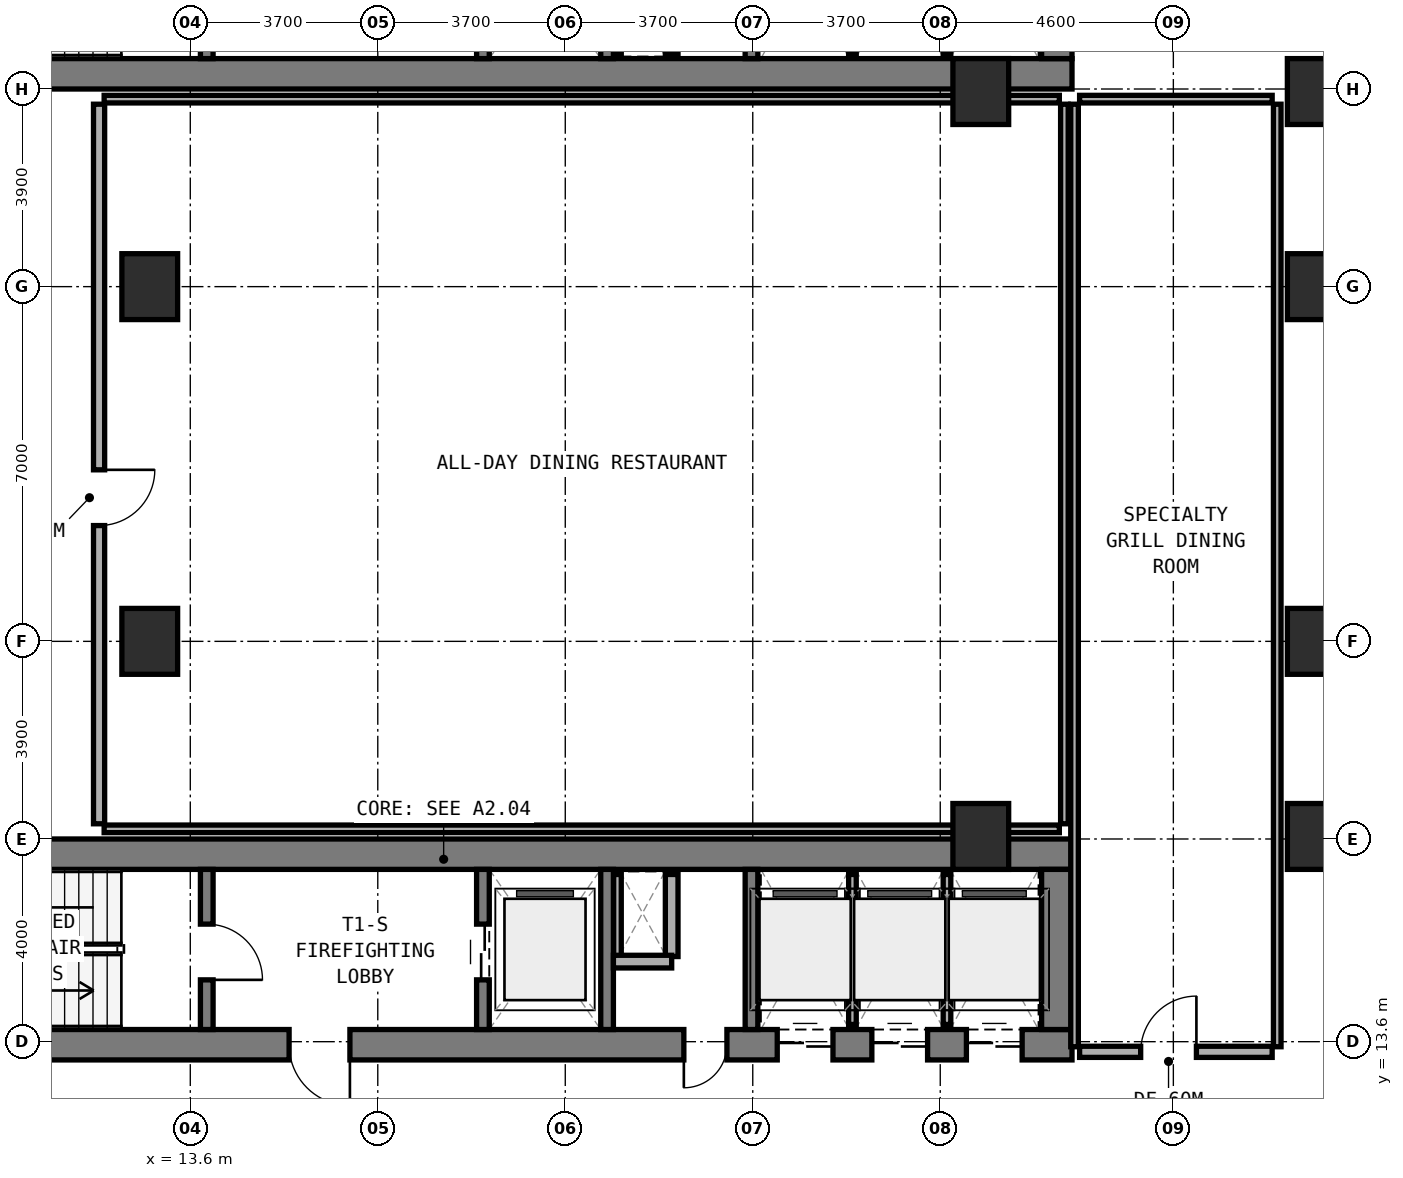
"""IFC4 building model, lengths in metres.
Left out: names, types, materials, properties, quantities, classifications, styles, units other than length and angle.
Written with IfcOpenShell. Run it as: python <this file> out.ifc"""

import sys

from ifc_helpers import new_model, si_unit, direction, frame, frame_2d, origin, origin_2d, place, context, subcontext, project, spatial, rectangle, extrude, element, fill, save


model = new_model("IFC4")
c1 = context("Model", 3, precision=1e-05, world=origin(), true_north=direction((0.0, 1.0)))
c2 = subcontext(c1, "Body", "Model", "MODEL_VIEW")
j1 = project(units=[si_unit("LENGTHUNIT", "METRE"), si_unit("PLANEANGLEUNIT", "RADIAN")], contexts=[c1])
p1 = place(None, origin())
s1 = spatial("IfcSite", under=j1, at=p1, CompositionType="ELEMENT")
p2 = place(p1, origin())
s2 = spatial("IfcBuilding", under=s1, at=p2, CompositionType="ELEMENT")
p3 = place(p2, frame((0.0, 0.0, 5.4)))
s3 = spatial("IfcBuildingStorey", under=s2, at=p3, CompositionType="ELEMENT", Elevation=5.4)
p4 = place(p3, frame((6.2, 32.7, 0.0), z_axis=(0.0, 0.0, 1.0), x_axis=(1.0, 0.0, 0.0)))
e1 = element("IfcWall", 1, at=p4, inside=s3, PredefinedType="SHEAR", context=c2, shape_type="SweptSolid", body=[
    extrude(rectangle(XDim=24.8, YDim=0.6, at=frame_2d((12.4, 0.0))), origin(), (0.0, 0.0, 1.0), 4.8),
])
p5 = place(p3, frame((30.7, 33.0, 0.0), z_axis=(0.0, 0.0, 1.0), x_axis=(0.0, 1.0, 0.0)))
e2 = element("IfcWall", 2, at=p5, inside=s3, PredefinedType="SHEAR", context=c2, shape_type="SweptSolid", body=[
    extrude(rectangle(XDim=3.16, YDim=0.6, at=frame_2d((1.58, 0.0))), origin(), (0.0, 0.0, 1.0), 4.8),
])
p6 = place(p3, frame((13.925, 33.0, 0.0), z_axis=(0.0, 0.0, 1.0), x_axis=(0.0, 1.0, 0.0)))
e3 = element("IfcWall", 3, at=p6, inside=s3, PredefinedType="STANDARD", context=c2, shape_type="SweptSolid", body=[
    extrude(rectangle(XDim=3.16, YDim=0.25, at=frame_2d((1.58, 0.0))), origin(), (0.0, 0.0, 1.0), 4.45),
])
p7 = place(p6, frame((0.98, 0.0, 0.0)))
e4 = element("IfcOpeningElement", 4, at=p7, cuts=e3, PredefinedType="OPENING", context=c2, shape_type="SweptSolid", body=[
    extrude(rectangle(XDim=1.1, YDim=2.15, at=frame_2d((0.55, 1.075))), frame((0.0, 0.135, 0.0), z_axis=(0.0, -1.0, 0.0), x_axis=(1.0, 0.0, 0.0)), (0.0, 0.0, 1.0), 0.27),
])
p8 = place(p3, frame((19.375, 33.0, 0.0), z_axis=(0.0, 0.0, 1.0), x_axis=(0.0, 1.0, 0.0)))
e5 = element("IfcWall", 5, at=p8, inside=s3, PredefinedType="STANDARD", context=c2, shape_type="SweptSolid", body=[
    extrude(rectangle(XDim=3.16, YDim=0.25, at=frame_2d((1.58, 0.0))), origin(), (0.0, 0.0, 1.0), 4.45),
])
p9 = place(p8, frame((0.98, 0.0, 0.0)))
e6 = element("IfcOpeningElement", 6, at=p9, cuts=e5, PredefinedType="OPENING", context=c2, shape_type="SweptSolid", body=[
    extrude(rectangle(XDim=1.1, YDim=2.15, at=frame_2d((0.55, 1.075))), frame((0.0, 0.135, 0.0), z_axis=(0.0, -1.0, 0.0), x_axis=(1.0, 0.0, 0.0)), (0.0, 0.0, 1.0), 0.27),
])
for number, where, z_axis, x_axis in (
    (7, (21.825, 33.0, 0.0), (0.0, 0.0, 1.0), (0.0, 1.0, 0.0)),
    (8, (24.675, 33.0, 0.0), (0.0, 0.0, 1.0), (0.0, 1.0, 0.0)),
):
    element("IfcWall", number, at=place(p3, frame(where, z_axis=z_axis, x_axis=x_axis)), inside=s3, PredefinedType="STANDARD", context=c2, shape_type="SweptSolid", body=[
        extrude(rectangle(XDim=3.16, YDim=0.25, at=frame_2d((1.58, 0.0))), origin(), (0.0, 0.0, 1.0), 4.45),
    ])
p10 = place(p3, frame((6.2, 13.54, 0.0), z_axis=(0.0, 0.0, 1.0), x_axis=(1.0, 0.0, 0.0)))
e9 = element("IfcWall", 9, at=p10, inside=s3, PredefinedType="SHEAR", context=c2, shape_type="SweptSolid", body=[
    extrude(rectangle(XDim=24.8, YDim=0.6, at=frame_2d((12.4, 0.0))), origin(), (0.0, 0.0, 1.0), 4.8),
])
p11 = place(p10, frame((9.35, 0.0, 0.0)))
e10 = element("IfcOpeningElement", 10, at=p11, cuts=e9, PredefinedType="OPENING", context=c2, shape_type="SweptSolid", body=[
    extrude(rectangle(XDim=1.2, YDim=2.15, at=frame_2d((0.6, 1.075))), frame((0.0, 0.31, 0.0), z_axis=(0.0, -1.0, 0.0), x_axis=(1.0, 0.0, 0.0)), (0.0, 0.0, 1.0), 0.62),
])
p12 = place(p10, frame((17.14, 0.0, 0.0)))
e11 = element("IfcOpeningElement", 11, at=p12, cuts=e9, PredefinedType="OPENING", context=c2, shape_type="SweptSolid", body=[
    extrude(rectangle(XDim=0.85, YDim=2.1, at=frame_2d((0.425, 1.05))), frame((0.0, 0.31, 0.0), z_axis=(0.0, -1.0, 0.0), x_axis=(1.0, 0.0, 0.0)), (0.0, 0.0, 1.0), 0.62),
])
p13 = place(p10, frame((18.983, 0.0, 0.0)))
e12 = element("IfcOpeningElement", 12, at=p13, cuts=e9, PredefinedType="OPENING", context=c2, shape_type="SweptSolid", body=[
    extrude(rectangle(XDim=1.1, YDim=2.15, at=frame_2d((0.55, 1.075))), frame((0.0, 0.31, 0.0), z_axis=(0.0, -1.0, 0.0), x_axis=(1.0, 0.0, 0.0)), (0.0, 0.0, 1.0), 0.62),
])
p14 = place(p10, frame((20.85, 0.0, 0.0)))
e13 = element("IfcOpeningElement", 13, at=p14, cuts=e9, PredefinedType="OPENING", context=c2, shape_type="SweptSolid", body=[
    extrude(rectangle(XDim=1.1, YDim=2.15, at=frame_2d((0.55, 1.075))), frame((0.0, 0.31, 0.0), z_axis=(0.0, -1.0, 0.0), x_axis=(1.0, 0.0, 0.0)), (0.0, 0.0, 1.0), 0.62),
])
p15 = place(p10, frame((22.716, 0.0, 0.0)))
e14 = element("IfcOpeningElement", 14, at=p15, cuts=e9, PredefinedType="OPENING", context=c2, shape_type="SweptSolid", body=[
    extrude(rectangle(XDim=1.1, YDim=2.15, at=frame_2d((0.55, 1.075))), frame((0.0, 0.31, 0.0), z_axis=(0.0, -1.0, 0.0), x_axis=(1.0, 0.0, 0.0)), (0.0, 0.0, 1.0), 0.62),
])
p16 = place(p3, frame((6.2, 17.3, 0.0), z_axis=(0.0, 0.0, 1.0), x_axis=(1.0, 0.0, 0.0)))
e15 = element("IfcWall", 15, at=p16, inside=s3, PredefinedType="SHEAR", context=c2, shape_type="SweptSolid", body=[
    extrude(rectangle(XDim=24.8, YDim=0.6, at=frame_2d((12.4, 0.0))), origin(), (0.0, 0.0, 1.0), 4.8),
])
p17 = place(p3, frame((30.7, 13.84, 0.0), z_axis=(0.0, 0.0, 1.0), x_axis=(0.0, 1.0, 0.0)))
e16 = element("IfcWall", 16, at=p17, inside=s3, PredefinedType="SHEAR", context=c2, shape_type="SweptSolid", body=[
    extrude(rectangle(XDim=3.16, YDim=0.6, at=frame_2d((1.58, 0.0))), origin(), (0.0, 0.0, 1.0), 4.8),
])
p18 = place(p3, frame((13.925, 13.84, 0.0), z_axis=(0.0, 0.0, 1.0), x_axis=(0.0, 1.0, 0.0)))
e17 = element("IfcWall", 17, at=p18, inside=s3, PredefinedType="STANDARD", context=c2, shape_type="SweptSolid", body=[
    extrude(rectangle(XDim=3.16, YDim=0.25, at=frame_2d((1.58, 0.0))), origin(), (0.0, 0.0, 1.0), 4.45),
])
p19 = place(p18, frame((0.98, 0.0, 0.0)))
e18 = element("IfcOpeningElement", 18, at=p19, cuts=e17, PredefinedType="OPENING", context=c2, shape_type="SweptSolid", body=[
    extrude(rectangle(XDim=1.1, YDim=2.15, at=frame_2d((0.55, 1.075))), frame((0.0, 0.135, 0.0), z_axis=(0.0, -1.0, 0.0), x_axis=(1.0, 0.0, 0.0)), (0.0, 0.0, 1.0), 0.27),
])
p20 = place(p3, frame((19.375, 13.84, 0.0), z_axis=(0.0, 0.0, 1.0), x_axis=(0.0, 1.0, 0.0)))
e19 = element("IfcWall", 19, at=p20, inside=s3, PredefinedType="STANDARD", context=c2, shape_type="SweptSolid", body=[
    extrude(rectangle(XDim=3.16, YDim=0.25, at=frame_2d((1.58, 0.0))), origin(), (0.0, 0.0, 1.0), 4.45),
])
p21 = place(p20, frame((0.98, 0.0, 0.0)))
e20 = element("IfcOpeningElement", 20, at=p21, cuts=e19, PredefinedType="OPENING", context=c2, shape_type="SweptSolid", body=[
    extrude(rectangle(XDim=1.1, YDim=2.15, at=frame_2d((0.55, 1.075))), frame((0.0, 0.135, 0.0), z_axis=(0.0, -1.0, 0.0), x_axis=(1.0, 0.0, 0.0)), (0.0, 0.0, 1.0), 0.27),
])
for number, where, z_axis, x_axis in (
    (21, (21.825, 13.84, 0.0), (0.0, 0.0, 1.0), (0.0, 1.0, 0.0)),
    (22, (24.675, 13.84, 0.0), (0.0, 0.0, 1.0), (0.0, 1.0, 0.0)),
):
    element("IfcWall", number, at=place(p3, frame(where, z_axis=z_axis, x_axis=x_axis)), inside=s3, PredefinedType="STANDARD", context=c2, shape_type="SweptSolid", body=[
        extrude(rectangle(XDim=3.16, YDim=0.25, at=frame_2d((1.58, 0.0))), origin(), (0.0, 0.0, 1.0), 4.45),
    ])
for number, where, z_axis, x_axis in (
    (23, (35.8, 21.5, 0.0), (0.0, 0.0, 1.0), (1.0, 0.0, 0.0)),
    (24, (35.8, 28.5, 0.0), (0.0, 0.0, 1.0), (1.0, 0.0, 0.0)),
    (25, (35.8, 17.65, 0.0), (0.0, 0.0, 1.0), (1.0, 0.0, 0.0)),
    (26, (35.8, 32.35, 0.0), (0.0, 0.0, 1.0), (1.0, 0.0, 0.0)),
    (27, (12.8, 21.5, 0.0), (0.0, 0.0, 1.0), (1.0, 0.0, 0.0)),
    (28, (12.8, 28.5, 0.0), (0.0, 0.0, 1.0), (1.0, 0.0, 0.0)),
    (29, (29.2, 17.65, 0.0), (0.0, 0.0, 1.0), (1.0, 0.0, 0.0)),
    (30, (29.2, 32.35, 0.0), (0.0, 0.0, 1.0), (1.0, 0.0, 0.0)),
):
    element("IfcColumn", number, at=place(p3, frame(where, z_axis=z_axis, x_axis=x_axis)), inside=s3, PredefinedType="COLUMN", context=c2, shape_type="SweptSolid", body=[
        extrude(rectangle(XDim=1.1, YDim=1.3, at=origin_2d()), origin(), (0.0, 0.0, 1.0), 4.8),
    ])
p22 = place(p3, frame((22.03, 33.1, 0.0), z_axis=(0.0, 0.0, 1.0), x_axis=(0.0, 1.0, 0.0)))
e31 = element("IfcWall", 31, at=p22, inside=s3, PredefinedType="PARTITIONING", context=c2, shape_type="SweptSolid", body=[
    extrude(rectangle(XDim=1.62, YDim=0.15, at=frame_2d((0.81, 0.0))), origin(), (0.0, 0.0, 1.0), 4.45),
])
p23 = place(p3, frame((23.1, 33.1, 0.0), z_axis=(0.0, 0.0, 1.0), x_axis=(0.0, 1.0, 0.0)))
e32 = element("IfcWall", 32, at=p23, inside=s3, PredefinedType="SOLIDWALL", context=c2, shape_type="SweptSolid", body=[
    extrude(rectangle(XDim=1.62, YDim=0.25, at=frame_2d((0.81, 0.0))), origin(), (0.0, 0.0, 1.0), 4.45),
])
p24 = place(p3, frame((26.667, 33.1, 0.0), z_axis=(0.0, 0.0, 1.0), x_axis=(0.0, 1.0, 0.0)))
e33 = element("IfcWall", 33, at=p24, inside=s3, PredefinedType="PARTITIONING", context=c2, shape_type="SweptSolid", body=[
    extrude(rectangle(XDim=2.96, YDim=0.15, at=frame_2d((1.48, 0.0))), origin(), (0.0, 0.0, 1.0), 4.45),
])
p25 = place(p3, frame((28.533, 33.1, 0.0), z_axis=(0.0, 0.0, 1.0), x_axis=(0.0, 1.0, 0.0)))
e34 = element("IfcWall", 34, at=p25, inside=s3, PredefinedType="PARTITIONING", context=c2, shape_type="SweptSolid", body=[
    extrude(rectangle(XDim=2.96, YDim=0.15, at=frame_2d((1.48, 0.0))), origin(), (0.0, 0.0, 1.0), 3.525),
])
p26 = place(p3, frame((22.03, 15.28, 0.0), z_axis=(0.0, 0.0, 1.0), x_axis=(0.0, 1.0, 0.0)))
e35 = element("IfcWall", 35, at=p26, inside=s3, PredefinedType="PARTITIONING", context=c2, shape_type="SweptSolid", body=[
    extrude(rectangle(XDim=1.62, YDim=0.15, at=frame_2d((0.81, 0.0))), origin(), (0.0, 0.0, 1.0), 4.45),
])
p27 = place(p3, frame((23.1, 15.28, 0.0), z_axis=(0.0, 0.0, 1.0), x_axis=(0.0, 1.0, 0.0)))
e36 = element("IfcWall", 36, at=p27, inside=s3, PredefinedType="SOLIDWALL", context=c2, shape_type="SweptSolid", body=[
    extrude(rectangle(XDim=1.62, YDim=0.25, at=frame_2d((0.81, 0.0))), origin(), (0.0, 0.0, 1.0), 4.45),
])
p28 = place(p3, frame((21.95, 15.18, 0.0), z_axis=(0.0, 0.0, 1.0), x_axis=(1.0, 0.0, 0.0)))
e37 = element("IfcWall", 37, at=p28, inside=s3, PredefinedType="SOLIDWALL", context=c2, shape_type="SweptSolid", body=[
    extrude(rectangle(XDim=1.15, YDim=0.25, at=frame_2d((0.575, 0.0))), origin(), (0.0, 0.0, 1.0), 4.45),
])
p29 = place(p3, frame((26.667, 13.94, 0.0), z_axis=(0.0, 0.0, 1.0), x_axis=(0.0, 1.0, 0.0)))
e38 = element("IfcWall", 38, at=p29, inside=s3, PredefinedType="PARTITIONING", context=c2, shape_type="SweptSolid", body=[
    extrude(rectangle(XDim=2.96, YDim=0.15, at=frame_2d((1.48, 0.0))), origin(), (0.0, 0.0, 1.0), 4.45),
])
p30 = place(p3, frame((28.533, 13.94, 0.0), z_axis=(0.0, 0.0, 1.0), x_axis=(0.0, 1.0, 0.0)))
e39 = element("IfcWall", 39, at=p30, inside=s3, PredefinedType="PARTITIONING", context=c2, shape_type="SweptSolid", body=[
    extrude(rectangle(XDim=2.96, YDim=0.15, at=frame_2d((1.48, 0.0))), origin(), (0.0, 0.0, 1.0), 3.525),
])
p31 = place(p3, frame((30.85, 17.9, 0.0), z_axis=(0.0, 0.0, 1.0), x_axis=(0.0, 1.0, 0.0)))
e40 = element("IfcWall", 40, at=p31, inside=s3, PredefinedType="PARTITIONING", context=c2, shape_type="SweptSolid", body=[
    extrude(rectangle(XDim=14.2, YDim=0.15, at=frame_2d((7.1, 0.0))), origin(), (0.0, 0.0, 1.0), 3.425),
])
for number, where, z_axis, x_axis in (
    (41, (11.9, 17.8, 0.0), (0.0, 0.0, 1.0), (1.0, 0.0, 0.0)),
    (42, (11.9, 32.2, 0.0), (0.0, 0.0, 1.0), (1.0, 0.0, 0.0)),
):
    element("IfcWall", number, at=place(p3, frame(where, z_axis=z_axis, x_axis=x_axis)), inside=s3, PredefinedType="PARTITIONING", context=c2, shape_type="SweptSolid", body=[
        extrude(rectangle(XDim=18.85, YDim=0.15, at=frame_2d((9.425, 0.0))), origin(), (0.0, 0.0, 1.0), 3.525),
    ])
p32 = place(p3, frame((11.8, 17.9, 0.0), z_axis=(0.0, 0.0, 1.0), x_axis=(0.0, 1.0, 0.0)))
e43 = element("IfcWall", 43, at=p32, inside=s3, PredefinedType="SOLIDWALL", context=c2, shape_type="SweptSolid", body=[
    extrude(rectangle(XDim=14.2, YDim=0.22, at=frame_2d((7.1, 0.0))), origin(), (0.0, 0.0, 1.0), 3.525),
])
p33 = place(p32, frame((5.885, 0.0, 0.0)))
e44 = element("IfcOpeningElement", 44, at=p33, cuts=e43, PredefinedType="OPENING", context=c2, shape_type="SweptSolid", body=[
    extrude(rectangle(XDim=1.1, YDim=2.1, at=frame_2d((0.55, 1.05))), frame((0.0, 0.12, 0.0), z_axis=(0.0, -1.0, 0.0), x_axis=(1.0, 0.0, 0.0)), (0.0, 0.0, 1.0), 0.24),
])
for number, where, z_axis, x_axis in (
    (45, (31.05, 13.5, 0.0), (0.0, 0.0, 1.0), (0.0, 1.0, 0.0)),
    (46, (35.05, 13.5, 0.0), (0.0, 0.0, 1.0), (0.0, 1.0, 0.0)),
):
    element("IfcWall", number, at=place(p3, frame(where, z_axis=z_axis, x_axis=x_axis)), inside=s3, PredefinedType="PARTITIONING", context=c2, shape_type="SweptSolid", body=[
        extrude(rectangle(XDim=18.6, YDim=0.15, at=frame_2d((9.3, 0.0))), origin(), (0.0, 0.0, 1.0), 3.425),
    ])
p34 = place(p3, frame((31.15, 32.2, 0.0), z_axis=(0.0, 0.0, 1.0), x_axis=(1.0, 0.0, 0.0)))
e47 = element("IfcWall", 47, at=p34, inside=s3, PredefinedType="PARTITIONING", context=c2, shape_type="SweptSolid", body=[
    extrude(rectangle(XDim=3.8, YDim=0.15, at=frame_2d((1.9, 0.0))), origin(), (0.0, 0.0, 1.0), 3.525),
])
p35 = place(p3, frame((31.15, 13.4, 0.0), z_axis=(0.0, 0.0, 1.0), x_axis=(1.0, 0.0, 0.0)))
e48 = element("IfcWall", 48, at=p35, inside=s3, PredefinedType="SOLIDWALL", context=c2, shape_type="SweptSolid", body=[
    extrude(rectangle(XDim=3.8, YDim=0.22, at=frame_2d((1.9, 0.0))), origin(), (0.0, 0.0, 1.0), 3.975),
])
p36 = place(p35, frame((1.205, 0.0, 0.0)))
e49 = element("IfcOpeningElement", 49, at=p36, cuts=e48, PredefinedType="OPENING", context=c2, shape_type="SweptSolid", body=[
    extrude(rectangle(XDim=1.1, YDim=2.1, at=frame_2d((0.55, 1.05))), frame((0.0, 0.12, 0.0), z_axis=(0.0, -1.0, 0.0), x_axis=(1.0, 0.0, 0.0)), (0.0, 0.0, 1.0), 0.24),
])
p37 = place(p19, frame((1.1, 0.0, 0.0), z_axis=(0.0, 0.0, 1.0), x_axis=(-1.0, 0.0, 0.0)))
e50 = element("IfcDoor", 50, at=p37, inside=s3, OperationType="SINGLE_SWING_RIGHT", PredefinedType="DOOR", context=c2, shape_type="SweptSolid", body=[
    extrude(rectangle(XDim=1.1, YDim=2.15, at=frame_2d((0.55, 1.075))), frame((0.0, 0.025, 0.0), z_axis=(0.0, -1.0, 0.0), x_axis=(1.0, 0.0, 0.0)), (0.0, 0.0, 1.0), 0.05),
])
fill(e18, e50)
p38 = place(p11, frame((1.2, 0.0, 0.0), z_axis=(0.0, 0.0, 1.0), x_axis=(-1.0, 0.0, 0.0)))
e51 = element("IfcDoor", 51, at=p38, inside=s3, OperationType="SINGLE_SWING_LEFT", PredefinedType="DOOR", context=c2, shape_type="SweptSolid", body=[
    extrude(rectangle(XDim=1.2, YDim=2.15, at=frame_2d((0.6, 1.075))), frame((0.0, 0.025, 0.0), z_axis=(0.0, -1.0, 0.0), x_axis=(1.0, 0.0, 0.0)), (0.0, 0.0, 1.0), 0.05),
])
fill(e10, e51)
p39 = place(p21, origin())
e52 = element("IfcDoor", 52, at=p39, inside=s3, OperationType="DOUBLE_DOOR_SLIDING", PredefinedType="DOOR", context=c2, shape_type="SweptSolid", body=[
    extrude(rectangle(XDim=1.1, YDim=2.15, at=frame_2d((0.55, 1.075))), frame((0.0, 0.025, 0.0), z_axis=(0.0, -1.0, 0.0), x_axis=(1.0, 0.0, 0.0)), (0.0, 0.0, 1.0), 0.05),
])
fill(e20, e52)
p40 = place(p12, frame((0.85, 0.0, 0.0), z_axis=(0.0, 0.0, 1.0), x_axis=(-1.0, 0.0, 0.0)))
e53 = element("IfcDoor", 53, at=p40, inside=s3, OperationType="SINGLE_SWING_RIGHT", PredefinedType="DOOR", context=c2, shape_type="SweptSolid", body=[
    extrude(rectangle(XDim=0.85, YDim=2.1, at=frame_2d((0.425, 1.05))), frame((0.0, 0.025, 0.0), z_axis=(0.0, -1.0, 0.0), x_axis=(1.0, 0.0, 0.0)), (0.0, 0.0, 1.0), 0.05),
])
fill(e11, e53)
p41 = place(p13, frame((1.1, 0.0, 0.0), z_axis=(0.0, 0.0, 1.0), x_axis=(-1.0, 0.0, 0.0)))
e54 = element("IfcDoor", 54, at=p41, inside=s3, OperationType="DOUBLE_DOOR_SLIDING", PredefinedType="DOOR", context=c2, shape_type="SweptSolid", body=[
    extrude(rectangle(XDim=1.1, YDim=2.15, at=frame_2d((0.55, 1.075))), frame((0.0, 0.025, 0.0), z_axis=(0.0, -1.0, 0.0), x_axis=(1.0, 0.0, 0.0)), (0.0, 0.0, 1.0), 0.05),
])
fill(e12, e54)
p42 = place(p14, frame((1.1, 0.0, 0.0), z_axis=(0.0, 0.0, 1.0), x_axis=(-1.0, 0.0, 0.0)))
e55 = element("IfcDoor", 55, at=p42, inside=s3, OperationType="DOUBLE_DOOR_SLIDING", PredefinedType="DOOR", context=c2, shape_type="SweptSolid", body=[
    extrude(rectangle(XDim=1.1, YDim=2.15, at=frame_2d((0.55, 1.075))), frame((0.0, 0.025, 0.0), z_axis=(0.0, -1.0, 0.0), x_axis=(1.0, 0.0, 0.0)), (0.0, 0.0, 1.0), 0.05),
])
fill(e13, e55)
p43 = place(p15, frame((1.1, 0.0, 0.0), z_axis=(0.0, 0.0, 1.0), x_axis=(-1.0, 0.0, 0.0)))
e56 = element("IfcDoor", 56, at=p43, inside=s3, OperationType="DOUBLE_DOOR_SLIDING", PredefinedType="DOOR", context=c2, shape_type="SweptSolid", body=[
    extrude(rectangle(XDim=1.1, YDim=2.15, at=frame_2d((0.55, 1.075))), frame((0.0, 0.025, 0.0), z_axis=(0.0, -1.0, 0.0), x_axis=(1.0, 0.0, 0.0)), (0.0, 0.0, 1.0), 0.05),
])
fill(e14, e56)
p44 = place(p33, frame((1.1, 0.0, 0.0), z_axis=(0.0, 0.0, 1.0), x_axis=(-1.0, 0.0, 0.0)))
e57 = element("IfcDoor", 57, at=p44, inside=s3, OperationType="SINGLE_SWING_LEFT", PredefinedType="DOOR", context=c2, shape_type="SweptSolid", body=[
    extrude(rectangle(XDim=1.1, YDim=2.1, at=frame_2d((0.55, 1.05))), frame((0.0, 0.025, 0.0), z_axis=(0.0, -1.0, 0.0), x_axis=(1.0, 0.0, 0.0)), (0.0, 0.0, 1.0), 0.05),
])
fill(e44, e57)
p45 = place(p36, origin())
e58 = element("IfcDoor", 58, at=p45, inside=s3, OperationType="SINGLE_SWING_RIGHT", PredefinedType="DOOR", context=c2, shape_type="SweptSolid", body=[
    extrude(rectangle(XDim=1.1, YDim=2.1, at=frame_2d((0.55, 1.05))), frame((0.0, 0.025, 0.0), z_axis=(0.0, -1.0, 0.0), x_axis=(1.0, 0.0, 0.0)), (0.0, 0.0, 1.0), 0.05),
])
fill(e49, e58)
save(model, sys.argv[1])
